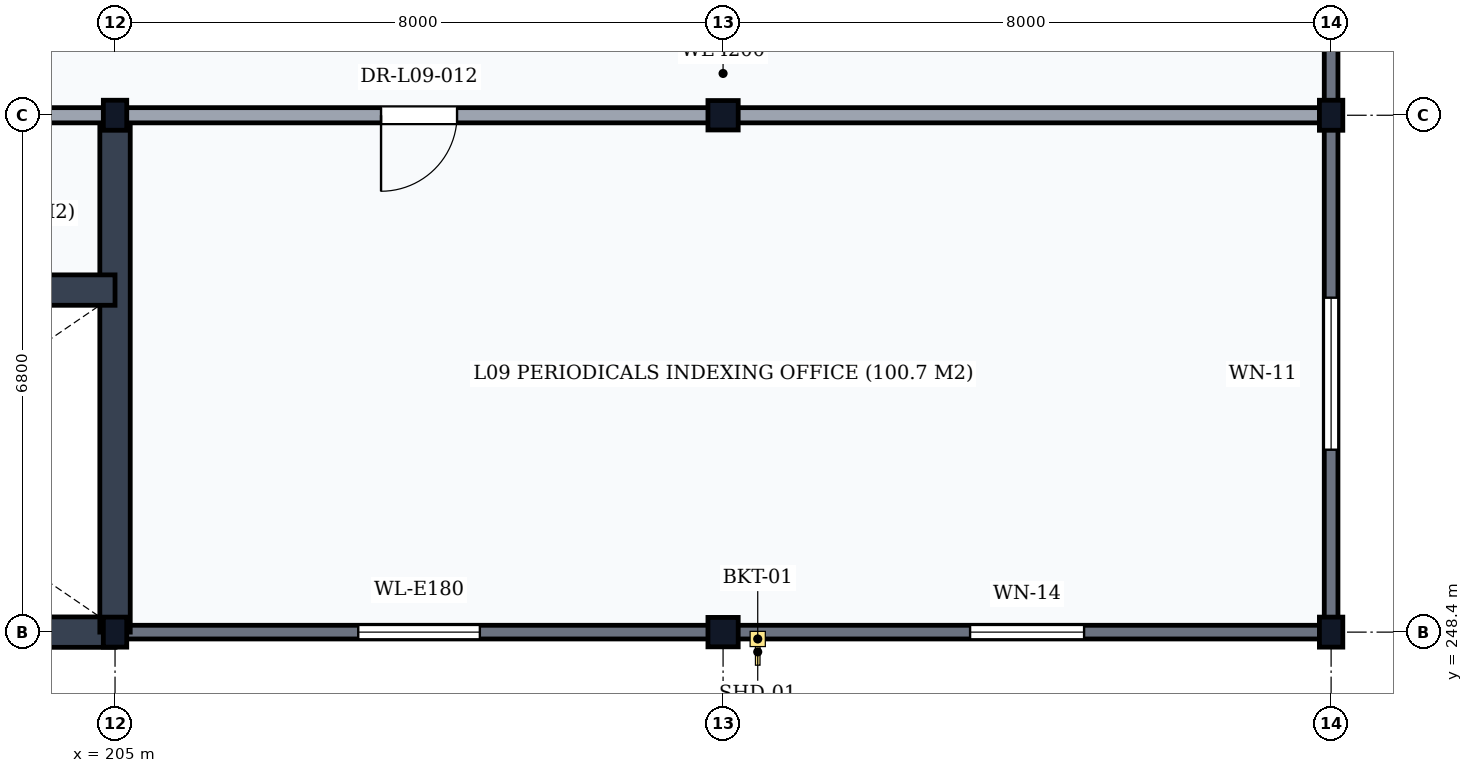
"""IFC4 building model, lengths in metres.
Left out: names, types, materials, properties, quantities, classifications, styles, units other than length and angle.
Written with IfcOpenShell. Run it as: python <this file> out.ifc"""

import sys

from ifc_helpers import new_model, si_unit, direction, frame, frame_2d, origin, origin_2d, place, context, subcontext, project, spatial, rectangle, i_section, extrude, element, fill, save


model = new_model("IFC4")
c1 = context("Model", 3, precision=1e-05, world=origin(), true_north=direction((0.0, 1.0)))
c2 = subcontext(c1, "Body", "Model", "MODEL_VIEW")
j1 = project(units=[si_unit("LENGTHUNIT", "METRE"), si_unit("PLANEANGLEUNIT", "RADIAN")], contexts=[c1])
p1 = place(None, origin())
s1 = spatial("IfcSite", under=j1, at=p1, CompositionType="ELEMENT")
p2 = place(p1, origin())
s2 = spatial("IfcBuilding", under=s1, at=p2, CompositionType="ELEMENT")
p3 = place(p2, frame((0.0, 0.0, 36.0)))
s3 = spatial("IfcBuildingStorey", under=s2, at=p3, CompositionType="ELEMENT", Elevation=36.0)
for number, where, z_axis, x_axis in (
    (1, (205.0, 248.4, 0.0), (0.0, 0.0, 1.0), (1.0, 0.0, 0.0)),
    (2, (205.0, 255.2, 0.0), (0.0, 0.0, 1.0), (1.0, 0.0, 0.0)),
):
    element("IfcColumn", number, at=place(p3, frame(where, z_axis=z_axis, x_axis=x_axis)), inside=s3, PredefinedType="COLUMN", context=c2, shape_type="SweptSolid", body=[
        extrude(i_section(OverallWidth=0.308, OverallDepth=0.395, WebThickness=0.021, FlangeThickness=0.04, FilletRadius=0.027, at=origin_2d()), origin(), (0.0, 0.0, 1.0), 3.9),
    ])
for number, where, z_axis, x_axis in (
    (3, (213.0, 248.4, 0.0), (0.0, 0.0, 1.0), (1.0, 0.0, 0.0)),
    (4, (213.0, 255.2, 0.0), (0.0, 0.0, 1.0), (1.0, 0.0, 0.0)),
):
    element("IfcColumn", number, at=place(p3, frame(where, z_axis=z_axis, x_axis=x_axis)), inside=s3, PredefinedType="COLUMN", context=c2, shape_type="SweptSolid", body=[
        extrude(i_section(OverallWidth=0.398, OverallDepth=0.387, WebThickness=0.021, FlangeThickness=0.033, FilletRadius=0.015, at=origin_2d()), origin(), (0.0, 0.0, 1.0), 3.9),
    ])
for number, where, z_axis, x_axis in (
    (5, (221.0, 248.4, 0.0), (0.0, 0.0, 1.0), (1.0, 0.0, 0.0)),
    (6, (221.0, 255.2, 0.0), (0.0, 0.0, 1.0), (1.0, 0.0, 0.0)),
):
    element("IfcColumn", number, at=place(p3, frame(where, z_axis=z_axis, x_axis=x_axis)), inside=s3, PredefinedType="COLUMN", context=c2, shape_type="SweptSolid", body=[
        extrude(i_section(OverallWidth=0.308, OverallDepth=0.395, WebThickness=0.021, FlangeThickness=0.04, FilletRadius=0.027, at=origin_2d()), origin(), (0.0, 0.0, 1.0), 3.9),
    ])
p4 = place(p3, frame((205.006, 248.4, 0.0), z_axis=(0.0, 0.0, 1.0), x_axis=(1.0, 0.0, 0.0)))
e7 = element("IfcWall", 7, at=p4, inside=s3, PredefinedType="SOLIDWALL", context=c2, shape_type="SweptSolid", body=[
    extrude(rectangle(XDim=7.988, YDim=0.18, at=frame_2d((3.994, 0.0))), origin(), (0.0, 0.0, 1.0), 3.368),
])
p5 = place(p4, frame((3.194, 0.0, 0.95)))
e8 = element("IfcOpeningElement", 8, at=p5, cuts=e7, PredefinedType="OPENING", context=c2, shape_type="SweptSolid", body=[
    extrude(rectangle(XDim=1.6, YDim=2.0, at=frame_2d((0.8, 1.0))), frame((0.0, 0.105, 0.0), z_axis=(0.0, -1.0, 0.0), x_axis=(1.0, 0.0, 0.0)), (0.0, 0.0, 1.0), 0.21),
])
p6 = place(p3, frame((213.006, 248.4, 0.0), z_axis=(0.0, 0.0, 1.0), x_axis=(1.0, 0.0, 0.0)))
e9 = element("IfcWall", 9, at=p6, inside=s3, PredefinedType="SOLIDWALL", context=c2, shape_type="SweptSolid", body=[
    extrude(rectangle(XDim=7.988, YDim=0.18, at=frame_2d((3.994, 0.0))), origin(), (0.0, 0.0, 1.0), 3.368),
])
p7 = place(p6, frame((3.244, 0.0, 0.95)))
e10 = element("IfcOpeningElement", 10, at=p7, cuts=e9, PredefinedType="OPENING", context=c2, shape_type="SweptSolid", body=[
    extrude(rectangle(XDim=1.5, YDim=1.9, at=frame_2d((0.75, 0.95))), frame((0.0, 0.105, 0.0), z_axis=(0.0, -1.0, 0.0), x_axis=(1.0, 0.0, 0.0)), (0.0, 0.0, 1.0), 0.21),
])
p8 = place(p3, frame((221.0, 248.406, 0.0), z_axis=(0.0, 0.0, 1.0), x_axis=(0.0, 1.0, 0.0)))
e11 = element("IfcWall", 11, at=p8, inside=s3, PredefinedType="SOLIDWALL", context=c2, shape_type="SweptSolid", body=[
    extrude(rectangle(XDim=6.788, YDim=0.18, at=frame_2d((3.394, 0.0))), origin(), (0.0, 0.0, 1.0), 3.448),
])
p9 = place(p8, frame((2.394, 0.0, 0.95)))
e12 = element("IfcOpeningElement", 12, at=p9, cuts=e11, PredefinedType="OPENING", context=c2, shape_type="SweptSolid", body=[
    extrude(rectangle(XDim=2.0, YDim=2.1, at=frame_2d((1.0, 1.05))), frame((0.0, 0.105, 0.0), z_axis=(0.0, -1.0, 0.0), x_axis=(1.0, 0.0, 0.0)), (0.0, 0.0, 1.0), 0.21),
])
p10 = place(p3, frame((221.0, 255.206, 0.0), z_axis=(0.0, 0.0, 1.0), x_axis=(0.0, 1.0, 0.0)))
e13 = element("IfcWall", 13, at=p10, inside=s3, PredefinedType="SOLIDWALL", context=c2, shape_type="SweptSolid", body=[
    extrude(rectangle(XDim=7.588, YDim=0.18, at=frame_2d((3.794, 0.0))), origin(), (0.0, 0.0, 1.0), 3.408),
])
p11 = place(p10, frame((4.166, 0.0, 0.95)))
e14 = element("IfcOpeningElement", 14, at=p11, cuts=e13, PredefinedType="OPENING", context=c2, shape_type="SweptSolid", body=[
    extrude(rectangle(XDim=1.8, YDim=2.0, at=frame_2d((0.9, 1.0))), frame((0.0, 0.105, 0.0), z_axis=(0.0, -1.0, 0.0), x_axis=(1.0, 0.0, 0.0)), (0.0, 0.0, 1.0), 0.21),
])
p12 = place(p3, frame((197.0, 248.4, 0.0), z_axis=(0.0, 0.0, 1.0), x_axis=(1.0, 0.0, 0.0)))
e15 = element("IfcWall", 15, at=p12, inside=s3, PredefinedType="SHEAR", context=c2, shape_type="SweptSolid", body=[
    extrude(rectangle(XDim=8.0, YDim=0.4, at=frame_2d((4.0, 0.0))), origin(), (0.0, 0.0, 1.0), 3.68),
])
p13 = place(p3, frame((205.0, 248.4, 0.0), z_axis=(0.0, 0.0, 1.0), x_axis=(0.0, 1.0, 0.0)))
e16 = element("IfcWall", 16, at=p13, inside=s3, PredefinedType="SHEAR", context=c2, shape_type="SweptSolid", body=[
    extrude(rectangle(XDim=6.8, YDim=0.4, at=frame_2d((3.4, 0.0))), origin(), (0.0, 0.0, 1.0), 3.68),
])
p14 = place(p3, frame((197.0, 252.9, 0.0), z_axis=(0.0, 0.0, 1.0), x_axis=(1.0, 0.0, 0.0)))
e17 = element("IfcWall", 17, at=p14, inside=s3, PredefinedType="SHEAR", context=c2, shape_type="SweptSolid", body=[
    extrude(rectangle(XDim=8.0, YDim=0.4, at=frame_2d((4.0, 0.0))), origin(), (0.0, 0.0, 1.0), 3.68),
])
p15 = place(p14, frame((0.3, 0.0, 0.0)))
e18 = element("IfcOpeningElement", 18, at=p15, cuts=e17, PredefinedType="OPENING", context=c2, shape_type="SweptSolid", body=[
    extrude(rectangle(XDim=1.15, YDim=2.15, at=frame_2d((0.575, 1.075))), frame((0.0, 0.215, 0.0), z_axis=(0.0, -1.0, 0.0), x_axis=(1.0, 0.0, 0.0)), (0.0, 0.0, 1.0), 0.43),
])
p16 = place(p3, frame((197.0, 255.2, 0.0), z_axis=(0.0, 0.0, 1.0), x_axis=(1.0, 0.0, 0.0)))
e19 = element("IfcWall", 19, at=p16, inside=s3, PredefinedType="PARTITIONING", context=c2, shape_type="SweptSolid", body=[
    extrude(rectangle(XDim=8.0, YDim=0.2, at=frame_2d((4.0, 0.0))), origin(), (0.0, 0.0, 1.0), 3.178),
])
p17 = place(p16, frame((3.275, 0.0, 0.0)))
e20 = element("IfcOpeningElement", 20, at=p17, cuts=e19, PredefinedType="OPENING", context=c2, shape_type="SweptSolid", body=[
    extrude(rectangle(XDim=1.45, YDim=2.2, at=frame_2d((0.725, 1.1))), frame((0.0, 0.115, 0.0), z_axis=(0.0, -1.0, 0.0), x_axis=(1.0, 0.0, 0.0)), (0.0, 0.0, 1.0), 0.23),
])
p18 = place(p3, frame((205.0, 255.2, 0.0), z_axis=(0.0, 0.0, 1.0), x_axis=(1.0, 0.0, 0.0)))
e21 = element("IfcWall", 21, at=p18, inside=s3, PredefinedType="PARTITIONING", context=c2, shape_type="SweptSolid", body=[
    extrude(rectangle(XDim=16.0, YDim=0.2, at=frame_2d((8.0, 0.0))), origin(), (0.0, 0.0, 1.0), 3.178),
])
p19 = place(p18, frame((3.5, 0.0, 0.0)))
e22 = element("IfcOpeningElement", 22, at=p19, cuts=e21, PredefinedType="OPENING", context=c2, shape_type="SweptSolid", body=[
    extrude(rectangle(XDim=1.0, YDim=2.1, at=frame_2d((0.5, 1.05))), frame((0.0, 0.115, 0.0), z_axis=(0.0, -1.0, 0.0), x_axis=(1.0, 0.0, 0.0)), (0.0, 0.0, 1.0), 0.23),
])
p20 = place(p5, origin())
e23 = element("IfcWindow", 23, at=p20, inside=s3, PartitioningType="SINGLE_PANEL", PredefinedType="WINDOW", context=c2, shape_type="SweptSolid", body=[
    extrude(rectangle(XDim=1.6, YDim=2.0, at=frame_2d((0.8, 1.0))), frame((0.0, 0.03, 0.0), z_axis=(0.0, -1.0, 0.0), x_axis=(1.0, 0.0, 0.0)), (0.0, 0.0, 1.0), 0.06),
])
fill(e8, e23)
p21 = place(p7, origin())
e24 = element("IfcWindow", 24, at=p21, inside=s3, PartitioningType="SINGLE_PANEL", PredefinedType="WINDOW", context=c2, shape_type="SweptSolid", body=[
    extrude(rectangle(XDim=1.5, YDim=1.9, at=frame_2d((0.75, 0.95))), frame((0.0, 0.03, 0.0), z_axis=(0.0, -1.0, 0.0), x_axis=(1.0, 0.0, 0.0)), (0.0, 0.0, 1.0), 0.06),
])
fill(e10, e24)
p22 = place(p9, origin())
e25 = element("IfcWindow", 25, at=p22, inside=s3, PartitioningType="DOUBLE_PANEL_VERTICAL", PredefinedType="WINDOW", context=c2, shape_type="SweptSolid", body=[
    extrude(rectangle(XDim=2.0, YDim=2.1, at=frame_2d((1.0, 1.05))), frame((0.0, 0.03, 0.0), z_axis=(0.0, -1.0, 0.0), x_axis=(1.0, 0.0, 0.0)), (0.0, 0.0, 1.0), 0.06),
])
fill(e12, e25)
p23 = place(p19, frame((1.0, 0.0, 0.0), z_axis=(0.0, 0.0, 1.0), x_axis=(-1.0, 0.0, 0.0)))
e26 = element("IfcDoor", 26, at=p23, inside=s3, OperationType="SINGLE_SWING_RIGHT", PredefinedType="DOOR", context=c2, shape_type="SweptSolid", body=[
    extrude(rectangle(XDim=1.0, YDim=2.1, at=frame_2d((0.5, 1.05))), frame((0.0, 0.025, 0.0), z_axis=(0.0, -1.0, 0.0), x_axis=(1.0, 0.0, 0.0)), (0.0, 0.0, 1.0), 0.05),
])
fill(e22, e26)
save(model, sys.argv[1])
